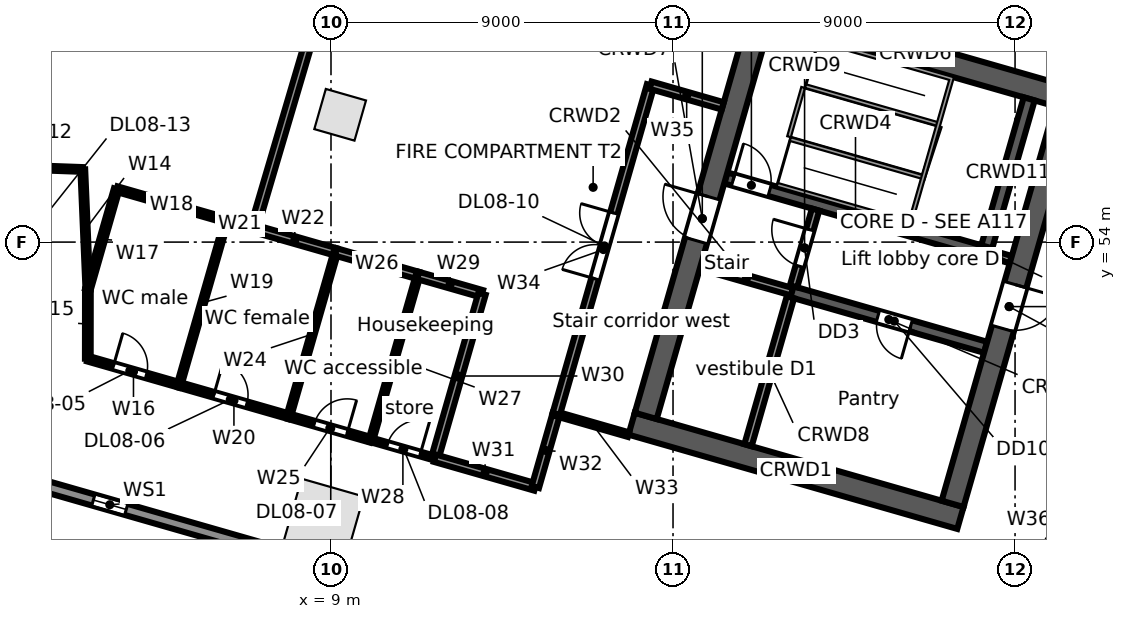
"""IFC4 building model, lengths in metres.
Left out: names, types, materials, properties, quantities, classifications, styles, units other than length and angle.
Written with IfcOpenShell. Run it as: python <this file> out.ifc"""

import sys

from ifc_helpers import new_model, si_unit, direction, frame, frame_2d, origin, origin_2d, place, context, subcontext, project, spatial, rectangle, extrude, element, fill, save


model = new_model("IFC4")
c1 = context("Model", 3, precision=1e-05, world=origin(), true_north=direction((0.0, 1.0)))
c2 = subcontext(c1, "Body", "Model", "MODEL_VIEW")
j1 = project(units=[si_unit("LENGTHUNIT", "METRE"), si_unit("PLANEANGLEUNIT", "RADIAN")], contexts=[c1])
p1 = place(None, origin())
s1 = spatial("IfcSite", under=j1, at=p1, CompositionType="ELEMENT")
p2 = place(p1, origin())
s2 = spatial("IfcBuilding", under=s1, at=p2, CompositionType="ELEMENT")
p3 = place(p2, frame((0.0, 0.0, 51.5)))
s3 = spatial("IfcBuildingStorey", under=s2, at=p3, CompositionType="ELEMENT", Elevation=51.5)
p4 = place(p3, frame((8.81, 46.722, 0.0), z_axis=(0.0, 0.0, 1.0), x_axis=(0.961261695938, -0.275637355817, 0.0)))
e1 = element("IfcColumn", 1, at=p4, inside=s3, PredefinedType="COLUMN", context=c2, shape_type="SweptSolid", body=[
    extrude(rectangle(XDim=1.7, YDim=1.7, at=origin_2d()), origin(), (0.0, 0.0, 1.0), 5.0),
])
p5 = place(p3, frame((9.241, 57.35, 0.0), z_axis=(0.0, 0.0, 1.0), x_axis=(0.961261695938, -0.275637355817, 0.0)))
e2 = element("IfcColumn", 2, at=p5, inside=s3, PredefinedType="COLUMN", context=c2, shape_type="SweptSolid", body=[
    extrude(rectangle(XDim=1.1, YDim=1.1, at=origin_2d()), origin(), (0.0, 0.0, 1.0), 5.0),
])
p6 = place(p3, frame((25.398, 40.717, 0.0), z_axis=(0.0, 0.0, 1.0), x_axis=(-0.961262423262, 0.275634819324, 0.0)))
e3 = element("IfcWall", 3, at=p6, inside=s3, PredefinedType="STANDARD", context=c2, shape_type="SweptSolid", body=[
    extrude(rectangle(XDim=26.359, YDim=0.3, at=frame_2d((13.179, 0.0))), origin(), (0.0, 0.0, 1.0), 4.68),
])
p7 = place(p6, frame((22.664, 0.0, 0.6)))
e4 = element("IfcOpeningElement", 4, at=p7, cuts=e3, PredefinedType="OPENING", context=c2, shape_type="SweptSolid", body=[
    extrude(rectangle(XDim=0.9, YDim=3.2, at=frame_2d((0.45, 1.6))), frame((0.0, 0.16, 0.0), z_axis=(0.0, -1.0, 0.0), x_axis=(1.0, 0.0, 0.0)), (0.0, 0.0, 1.0), 0.32),
])
p8 = place(p6, frame((13.844, 0.0, 0.6)))
e5 = element("IfcOpeningElement", 5, at=p8, cuts=e3, PredefinedType="OPENING", context=c2, shape_type="SweptSolid", body=[
    extrude(rectangle(XDim=0.9, YDim=3.2, at=frame_2d((0.45, 1.6))), frame((0.0, 0.16, 0.0), z_axis=(0.0, -1.0, 0.0), x_axis=(1.0, 0.0, 0.0)), (0.0, 0.0, 1.0), 0.32),
])
p9 = place(p6, frame((5.023, 0.0, 0.6)))
e6 = element("IfcOpeningElement", 6, at=p9, cuts=e3, PredefinedType="OPENING", context=c2, shape_type="SweptSolid", body=[
    extrude(rectangle(XDim=0.9, YDim=3.2, at=frame_2d((0.45, 1.6))), frame((0.0, 0.16, 0.0), z_axis=(0.0, -1.0, 0.0), x_axis=(1.0, 0.0, 0.0)), (0.0, 0.0, 1.0), 0.32),
])
p10 = place(p3, frame((16.911, 49.221, 0.0), z_axis=(0.0, 0.0, 1.0), x_axis=(0.96126248289, -0.275634611374, 0.0)))
e7 = element("IfcWall", 7, at=p10, inside=s3, PredefinedType="SOLIDWALL", context=c2, shape_type="SweptSolid", body=[
    extrude(rectangle(XDim=9.0, YDim=0.6, at=frame_2d((4.5, 0.0))), origin(), (0.0, 0.0, 1.0), 4.68),
])
p11 = place(p3, frame((18.728, 53.382, 0.0), z_axis=(0.0, 0.0, 1.0), x_axis=(0.961247070632, -0.275688355216, 0.0)))
e8 = element("IfcWall", 8, at=p11, inside=s3, PredefinedType="SOLIDWALL", context=c2, shape_type="SweptSolid", body=[
    extrude(rectangle(XDim=2.5, YDim=0.2, at=frame_2d((1.25, 0.0))), origin(), (0.0, 0.0, 1.0), 4.68),
])
p12 = place(p3, frame((21.131, 52.692, 0.0), z_axis=(0.0, 0.0, 1.0), x_axis=(0.961271492568, -0.275603188616, 0.0)))
e9 = element("IfcWall", 9, at=p12, inside=s3, PredefinedType="SOLIDWALL", context=c2, shape_type="SweptSolid", body=[
    extrude(rectangle(XDim=5.3, YDim=0.3, at=frame_2d((2.65, 0.0))), origin(), (0.0, 0.0, 1.0), 4.68),
])
p13 = place(p12, frame((2.35, 0.0, 0.0)))
e10 = element("IfcOpeningElement", 10, at=p13, cuts=e9, PredefinedType="OPENING", context=c2, shape_type="SweptSolid", body=[
    extrude(rectangle(XDim=0.9, YDim=2.1, at=frame_2d((0.45, 1.05))), frame((0.0, 0.16, 0.0), z_axis=(0.0, -1.0, 0.0), x_axis=(1.0, 0.0, 0.0)), (0.0, 0.0, 1.0), 0.32),
])
p14 = place(p3, frame((19.389, 55.689, 0.0), z_axis=(0.0, 0.0, 1.0), x_axis=(0.961261397636, -0.275638396117, 0.0)))
e11 = element("IfcWall", 11, at=p14, inside=s3, PredefinedType="SOLIDWALL", context=c2, shape_type="SweptSolid", body=[
    extrude(rectangle(XDim=7.1, YDim=0.3, at=frame_2d((3.55, 0.0))), origin(), (0.0, 0.0, 1.0), 4.68),
])
p15 = place(p14, frame((0.2, 0.0, 0.0)))
e12 = element("IfcOpeningElement", 12, at=p15, cuts=e11, PredefinedType="OPENING", context=c2, shape_type="SweptSolid", body=[
    extrude(rectangle(XDim=1.0, YDim=2.1, at=frame_2d((0.5, 1.05))), frame((0.0, 0.16, 0.0), z_axis=(0.0, -1.0, 0.0), x_axis=(1.0, 0.0, 0.0)), (0.0, 0.0, 1.0), 0.32),
])
p16 = place(p3, frame((26.214, 53.732, 0.0), z_axis=(0.0, 0.0, 1.0), x_axis=(0.96122076476, -0.27578005982, 0.0)))
e13 = element("IfcWall", 13, at=p16, inside=s3, PredefinedType="SOLIDWALL", context=c2, shape_type="SweptSolid", body=[
    extrude(rectangle(XDim=0.7, YDim=0.2, at=frame_2d((0.35, 0.0))), origin(), (0.0, 0.0, 1.0), 4.68),
])
p17 = place(p3, frame((20.053, 60.18, 0.0), z_axis=(0.0, 0.0, 1.0), x_axis=(0.96126248289, -0.275634611374, 0.0)))
e14 = element("IfcWall", 14, at=p17, inside=s3, PredefinedType="SOLIDWALL", context=c2, shape_type="SweptSolid", body=[
    extrude(rectangle(XDim=9.0, YDim=0.6, at=frame_2d((4.5, 0.0))), origin(), (0.0, 0.0, 1.0), 4.68),
])
p18 = place(p3, frame((17.282, 49.427, 0.0), z_axis=(0.0, 0.0, 1.0), x_axis=(0.275631631629, 0.961263337304, 0.0)))
e15 = element("IfcWall", 15, at=p18, inside=s3, PredefinedType="SOLIDWALL", context=c2, shape_type="SweptSolid", body=[
    extrude(rectangle(XDim=10.8, YDim=0.6, at=frame_2d((5.4, 0.0))), origin(), (0.0, 0.0, 1.0), 4.68),
])
p19 = place(p18, frame((4.8, 0.0, 0.0)))
e16 = element("IfcOpeningElement", 16, at=p19, cuts=e15, PredefinedType="OPENING", context=c2, shape_type="SweptSolid", body=[
    extrude(rectangle(XDim=1.2, YDim=2.1, at=frame_2d((0.6, 1.05))), frame((0.0, 0.31, 0.0), z_axis=(0.0, -1.0, 0.0), x_axis=(1.0, 0.0, 0.0)), (0.0, 0.0, 1.0), 0.62),
])
p20 = place(p3, frame((19.973, 48.655, 0.0), z_axis=(0.0, 0.0, 1.0), x_axis=(0.275668441653, 0.961252781674, 0.0)))
e17 = element("IfcWall", 17, at=p20, inside=s3, PredefinedType="SOLIDWALL", context=c2, shape_type="SweptSolid", body=[
    extrude(rectangle(XDim=4.05, YDim=0.2, at=frame_2d((2.025, 0.0))), origin(), (0.0, 0.0, 1.0), 4.68),
])
p21 = place(p3, frame((21.172, 52.837, 0.0), z_axis=(0.0, 0.0, 1.0), x_axis=(0.275657676022, 0.961255868981, 0.0)))
e18 = element("IfcWall", 18, at=p21, inside=s3, PredefinedType="PARTITIONING", context=c2, shape_type="SweptSolid", body=[
    extrude(rectangle(XDim=2.1, YDim=0.2, at=frame_2d((1.05, 0.0))), origin(), (0.0, 0.0, 1.0), 4.68),
])
p22 = place(p21, frame((0.55, 0.0, 0.0)))
e19 = element("IfcOpeningElement", 19, at=p22, cuts=e18, PredefinedType="OPENING", context=c2, shape_type="SweptSolid", body=[
    extrude(rectangle(XDim=1.0, YDim=2.1, at=frame_2d((0.5, 1.05))), frame((0.0, 0.11, 0.0), z_axis=(0.0, -1.0, 0.0), x_axis=(1.0, 0.0, 0.0)), (0.0, 0.0, 1.0), 0.22),
])
p23 = place(p3, frame((26.256, 53.876, 0.0), z_axis=(0.0, 0.0, 1.0), x_axis=(0.275612739511, 0.961268754209, 0.0)))
e20 = element("IfcWall", 20, at=p23, inside=s3, PredefinedType="SOLIDWALL", context=c2, shape_type="SweptSolid", body=[
    extrude(rectangle(XDim=4.05, YDim=0.3, at=frame_2d((2.025, 0.0))), origin(), (0.0, 0.0, 1.0), 4.68),
])
p24 = place(p3, frame((25.356, 47.112, 0.0), z_axis=(0.0, 0.0, 1.0), x_axis=(0.275631631629, 0.961263337304, 0.0)))
e21 = element("IfcWall", 21, at=p24, inside=s3, PredefinedType="SOLIDWALL", context=c2, shape_type="SweptSolid", body=[
    extrude(rectangle(XDim=10.8, YDim=0.6, at=frame_2d((5.4, 0.0))), origin(), (0.0, 0.0, 1.0), 4.68),
])
p25 = place(p24, frame((4.8, 0.0, 0.0)))
e22 = element("IfcOpeningElement", 22, at=p25, cuts=e21, PredefinedType="OPENING", context=c2, shape_type="SweptSolid", body=[
    extrude(rectangle(XDim=1.2, YDim=2.1, at=frame_2d((0.6, 1.05))), frame((0.0, 0.31, 0.0), z_axis=(0.0, -1.0, 0.0), x_axis=(1.0, 0.0, 0.0)), (0.0, 0.0, 1.0), 0.62),
])
p26 = place(p3, frame((0.0, 56.0, 0.0), z_axis=(0.0, 0.0, 1.0), x_axis=(0.999349313684, -0.036068673934, 0.0)))
e23 = element("IfcWall", 23, at=p26, inside=s3, PredefinedType="PARTITIONING", context=c2, shape_type="SweptSolid", body=[
    extrude(rectangle(XDim=2.471, YDim=0.125, at=frame_2d((1.235, 0.0))), origin(), (0.0, 0.0, 1.0), 4.68),
])
p27 = place(p26, frame((0.7, 0.0, 0.0)))
e24 = element("IfcOpeningElement", 24, at=p27, cuts=e23, PredefinedType="OPENING", context=c2, shape_type="SweptSolid", body=[
    extrude(rectangle(XDim=0.9, YDim=2.1, at=frame_2d((0.45, 1.05))), frame((0.0, 0.073, 0.0), z_axis=(0.0, -1.0, 0.0), x_axis=(1.0, 0.0, 0.0)), (0.0, 0.0, 1.0), 0.145),
])
p28 = place(p3, frame((2.469, 55.911, 0.0), z_axis=(0.0, 0.0, 1.0), x_axis=(0.042391721597, -0.99910106693, 0.0)))
e25 = element("IfcWall", 25, at=p28, inside=s3, PredefinedType="PARTITIONING", context=c2, shape_type="SweptSolid", body=[
    extrude(rectangle(XDim=3.162, YDim=0.125, at=frame_2d((1.581, 0.0))), origin(), (0.0, 0.0, 1.0), 4.68),
])
p29 = place(p3, frame((2.601, 50.932, 0.0), z_axis=(0.0, 0.0, 1.0), x_axis=(0.001073104681, 0.999999424223, 0.0)))
e26 = element("IfcWall", 26, at=p29, inside=s3, PredefinedType="PARTITIONING", context=c2, shape_type="SweptSolid", body=[
    extrude(rectangle(XDim=1.82, YDim=0.15, at=frame_2d((0.91, 0.0))), origin(), (0.0, 0.0, 1.0), 4.68),
])
p30 = place(p3, frame((2.601, 50.932, 0.0), z_axis=(0.0, 0.0, 1.0), x_axis=(0.961265528111, -0.275623991092, 0.0)))
e27 = element("IfcWall", 27, at=p30, inside=s3, PredefinedType="PARTITIONING", context=c2, shape_type="SweptSolid", body=[
    extrude(rectangle(XDim=2.5, YDim=0.15, at=frame_2d((1.25, 0.0))), origin(), (0.0, 0.0, 1.0), 4.68),
])
p31 = place(p30, frame((0.7, 0.0, 0.0)))
e28 = element("IfcOpeningElement", 28, at=p31, cuts=e27, PredefinedType="OPENING", context=c2, shape_type="SweptSolid", body=[
    extrude(rectangle(XDim=0.9, YDim=2.1, at=frame_2d((0.45, 1.05))), frame((0.0, 0.085, 0.0), z_axis=(0.0, -1.0, 0.0), x_axis=(1.0, 0.0, 0.0)), (0.0, 0.0, 1.0), 0.17),
])
p32 = place(p3, frame((2.603, 52.752, 0.0), z_axis=(0.0, 0.0, 1.0), x_axis=(0.27569433145, 0.961245356611, 0.0)))
e29 = element("IfcWall", 29, at=p32, inside=s3, PredefinedType="PARTITIONING", context=c2, shape_type="SweptSolid", body=[
    extrude(rectangle(XDim=2.75, YDim=0.15, at=frame_2d((1.375, 0.0))), origin(), (0.0, 0.0, 1.0), 4.68),
])
p33 = place(p3, frame((3.361, 55.395, 0.0), z_axis=(0.0, 0.0, 1.0), x_axis=(0.961268664977, -0.27561305073, 0.0)))
e30 = element("IfcWall", 30, at=p33, inside=s3, PredefinedType="PARTITIONING", context=c2, shape_type="SweptSolid", body=[
    extrude(rectangle(XDim=3.0, YDim=0.15, at=frame_2d((1.5, 0.0))), origin(), (0.0, 0.0, 1.0), 4.68),
])
p34 = place(p3, frame((5.004, 50.243, 0.0), z_axis=(0.0, 0.0, 1.0), x_axis=(0.275838825927, 0.961203902464, 0.0)))
e31 = element("IfcWall", 31, at=p34, inside=s3, PredefinedType="PARTITIONING", context=c2, shape_type="SweptSolid", body=[
    extrude(rectangle(XDim=4.5, YDim=0.125, at=frame_2d((2.25, 0.0))), origin(), (0.0, 0.0, 1.0), 4.68),
])
p35 = place(p3, frame((5.004, 50.243, 0.0), z_axis=(0.0, 0.0, 1.0), x_axis=(0.961268664977, -0.27561305073, 0.0)))
e32 = element("IfcWall", 32, at=p35, inside=s3, PredefinedType="PARTITIONING", context=c2, shape_type="SweptSolid", body=[
    extrude(rectangle(XDim=3.0, YDim=0.15, at=frame_2d((1.5, 0.0))), origin(), (0.0, 0.0, 1.0), 4.68),
])
p36 = place(p35, frame((0.95, 0.0, 0.0)))
e33 = element("IfcOpeningElement", 33, at=p36, cuts=e32, PredefinedType="OPENING", context=c2, shape_type="SweptSolid", body=[
    extrude(rectangle(XDim=0.9, YDim=2.1, at=frame_2d((0.45, 1.05))), frame((0.0, 0.085, 0.0), z_axis=(0.0, -1.0, 0.0), x_axis=(1.0, 0.0, 0.0)), (0.0, 0.0, 1.0), 0.17),
])
p37 = place(p3, frame((6.245, 54.568, 0.0), z_axis=(0.0, 0.0, 1.0), x_axis=(0.961499370144, -0.274807134575, 0.0)))
e34 = element("IfcWall", 34, at=p37, inside=s3, PredefinedType="PARTITIONING", context=c2, shape_type="SweptSolid", body=[
    extrude(rectangle(XDim=0.75, YDim=0.15, at=frame_2d((0.375, 0.0))), origin(), (0.0, 0.0, 1.0), 4.68),
])
p38 = place(p3, frame((6.966, 54.362, 0.0), z_axis=(0.0, 0.0, 1.0), x_axis=(0.961154610169, -0.276010534854, 0.0)))
e35 = element("IfcWall", 35, at=p38, inside=s3, PredefinedType="PARTITIONING", context=c2, shape_type="SweptSolid", body=[
    extrude(rectangle(XDim=2.25, YDim=0.2, at=frame_2d((1.125, 0.0))), origin(), (0.0, 0.0, 1.0), 3.852),
])
p39 = place(p3, frame((6.966, 54.362, 0.0), z_axis=(0.0, 0.0, 1.0), x_axis=(0.283027392509, 0.959111826165, 0.0)))
e36 = element("IfcWall", 36, at=p39, inside=s3, PredefinedType="PARTITIONING", context=c2, shape_type="SweptSolid", body=[
    extrude(rectangle(XDim=12.985, YDim=0.2, at=frame_2d((6.492, 0.0))), origin(), (0.0, 0.0, 1.0), 3.742),
])
p40 = place(p3, frame((7.888, 49.416, 0.0), z_axis=(0.0, 0.0, 1.0), x_axis=(0.275803080638, 0.96121415965, 0.0)))
e37 = element("IfcWall", 37, at=p40, inside=s3, PredefinedType="PARTITIONING", context=c2, shape_type="SweptSolid", body=[
    extrude(rectangle(XDim=4.5, YDim=0.125, at=frame_2d((2.25, 0.0))), origin(), (0.0, 0.0, 1.0), 3.852),
])
p41 = place(p3, frame((7.888, 49.416, 0.0), z_axis=(0.0, 0.0, 1.0), x_axis=(0.9611628742, -0.275981755301, 0.0)))
e38 = element("IfcWall", 38, at=p41, inside=s3, PredefinedType="PARTITIONING", context=c2, shape_type="SweptSolid", body=[
    extrude(rectangle(XDim=2.25, YDim=0.15, at=frame_2d((1.125, 0.0))), origin(), (0.0, 0.0, 1.0), 3.742),
])
p42 = place(p41, frame((0.7, 0.0, 0.0)))
e39 = element("IfcOpeningElement", 39, at=p42, cuts=e38, PredefinedType="OPENING", context=c2, shape_type="SweptSolid", body=[
    extrude(rectangle(XDim=0.9, YDim=2.1, at=frame_2d((0.45, 1.05))), frame((0.0, 0.085, 0.0), z_axis=(0.0, -1.0, 0.0), x_axis=(1.0, 0.0, 0.0)), (0.0, 0.0, 1.0), 0.17),
])
p43 = place(p3, frame((9.129, 53.741, 0.0), z_axis=(0.0, 0.0, 1.0), x_axis=(0.961273691875, -0.275595517578, 0.0)))
e40 = element("IfcWall", 40, at=p43, inside=s3, PredefinedType="PARTITIONING", context=c2, shape_type="SweptSolid", body=[
    extrude(rectangle(XDim=2.249, YDim=0.2, at=frame_2d((1.125, 0.0))), origin(), (0.0, 0.0, 1.0), 3.742),
])
p44 = place(p3, frame((10.051, 48.795, 0.0), z_axis=(0.0, 0.0, 1.0), x_axis=(0.275530671241, 0.961292280841, 0.0)))
e41 = element("IfcWall", 41, at=p44, inside=s3, PredefinedType="PARTITIONING", context=c2, shape_type="SweptSolid", body=[
    extrude(rectangle(XDim=4.5, YDim=0.125, at=frame_2d((2.25, 0.0))), origin(), (0.0, 0.0, 1.0), 4.68),
])
p45 = place(p3, frame((10.051, 48.795, 0.0), z_axis=(0.0, 0.0, 1.0), x_axis=(0.961313033798, -0.275458256455, 0.0)))
e42 = element("IfcWall", 42, at=p45, inside=s3, PredefinedType="PARTITIONING", context=c2, shape_type="SweptSolid", body=[
    extrude(rectangle(XDim=1.75, YDim=0.125, at=frame_2d((0.875, 0.0))), origin(), (0.0, 0.0, 1.0), 4.68),
])
p46 = place(p45, frame((0.45, 0.0, 0.0)))
e43 = element("IfcOpeningElement", 43, at=p46, cuts=e42, PredefinedType="OPENING", context=c2, shape_type="SweptSolid", body=[
    extrude(rectangle(XDim=0.9, YDim=2.1, at=frame_2d((0.45, 1.05))), frame((0.0, 0.073, 0.0), z_axis=(0.0, -1.0, 0.0), x_axis=(1.0, 0.0, 0.0)), (0.0, 0.0, 1.0), 0.145),
])
p47 = place(p3, frame((11.291, 53.121, 0.0), z_axis=(0.0, 0.0, 1.0), x_axis=(0.961329010357, -0.275402494264, 0.0)))
e44 = element("IfcWall", 44, at=p47, inside=s3, PredefinedType="PARTITIONING", context=c2, shape_type="SweptSolid", body=[
    extrude(rectangle(XDim=1.751, YDim=0.2, at=frame_2d((0.875, 0.0))), origin(), (0.0, 0.0, 1.0), 4.68),
])
p48 = place(p3, frame((11.733, 48.313, 0.0), z_axis=(0.0, 0.0, 1.0), x_axis=(0.275795676316, 0.961216284155, 0.0)))
e45 = element("IfcWall", 45, at=p48, inside=s3, PredefinedType="PARTITIONING", context=c2, shape_type="SweptSolid", body=[
    extrude(rectangle(XDim=4.5, YDim=0.2, at=frame_2d((2.25, 0.0))), origin(), (0.0, 0.0, 1.0), 4.68),
])
p49 = place(p3, frame((11.733, 48.313, 0.0), z_axis=(0.0, 0.0, 1.0), x_axis=(0.961272337704, -0.275600240865, 0.0)))
e46 = element("IfcWall", 46, at=p49, inside=s3, PredefinedType="PARTITIONING", context=c2, shape_type="SweptSolid", body=[
    extrude(rectangle(XDim=2.75, YDim=0.2, at=frame_2d((1.375, 0.0))), origin(), (0.0, 0.0, 1.0), 4.68),
])
p50 = place(p3, frame((14.377, 47.555, 0.0), z_axis=(0.0, 0.0, 1.0), x_axis=(0.275446387355, 0.961316434736, 0.0)))
e47 = element("IfcWall", 47, at=p50, inside=s3, PredefinedType="PARTITIONING", context=c2, shape_type="SweptSolid", body=[
    extrude(rectangle(XDim=2.0, YDim=0.2, at=frame_2d((1.0, 0.0))), origin(), (0.0, 0.0, 1.0), 4.68),
])
p51 = place(p3, frame((14.928, 49.478, 0.0), z_axis=(0.0, 0.0, 1.0), x_axis=(0.961243778232, -0.27569983462, 0.0)))
e48 = element("IfcWall", 48, at=p51, inside=s3, PredefinedType="PARTITIONING", context=c2, shape_type="SweptSolid", body=[
    extrude(rectangle(XDim=1.977, YDim=0.125, at=frame_2d((0.988, 0.0))), origin(), (0.0, 0.0, 1.0), 4.68),
])
p52 = place(p3, frame((14.928, 49.478, 0.0), z_axis=(0.0, 0.0, 1.0), x_axis=(0.275674053528, 0.961251172281, 0.0)))
e49 = element("IfcWall", 49, at=p52, inside=s3, PredefinedType="PARTITIONING", context=c2, shape_type="SweptSolid", body=[
    extrude(rectangle(XDim=9.0, YDim=0.2, at=frame_2d((4.5, 0.0))), origin(), (0.0, 0.0, 1.0), 3.742),
])
p53 = place(p52, frame((3.7, 0.0, 0.0)))
e50 = element("IfcOpeningElement", 50, at=p53, cuts=e49, PredefinedType="OPENING", context=c2, shape_type="SweptSolid", body=[
    extrude(rectangle(XDim=1.8, YDim=2.1, at=frame_2d((0.9, 1.05))), frame((0.0, 0.11, 0.0), z_axis=(0.0, -1.0, 0.0), x_axis=(1.0, 0.0, 0.0)), (0.0, 0.0, 1.0), 0.22),
])
p54 = place(p3, frame((17.409, 58.129, 0.0), z_axis=(0.0, 0.0, 1.0), x_axis=(0.961253165474, -0.275667103345, 0.0)))
e51 = element("IfcWall", 51, at=p54, inside=s3, PredefinedType="PARTITIONING", context=c2, shape_type="SweptSolid", body=[
    extrude(rectangle(XDim=1.977, YDim=0.2, at=frame_2d((0.988, 0.0))), origin(), (0.0, 0.0, 1.0), 4.68),
])
p55 = place(p3, frame((26.456, 42.338, 0.0), z_axis=(0.0, 0.0, 1.0), x_axis=(0.52980027265, 0.848122438743, 0.0)))
e52 = element("IfcWall", 52, at=p55, inside=s3, PredefinedType="PARTITIONING", context=c2, shape_type="SweptSolid", body=[
    extrude(rectangle(XDim=6.076, YDim=0.25, at=frame_2d((3.038, 0.0))), origin(), (0.0, 0.0, 1.0), 4.68),
])
p56 = place(p55, frame((2.2, 0.0, 0.0)))
e53 = element("IfcOpeningElement", 53, at=p56, cuts=e52, PredefinedType="OPENING", context=c2, shape_type="SweptSolid", body=[
    extrude(rectangle(XDim=1.8, YDim=2.1, at=frame_2d((0.9, 1.05))), frame((0.0, 0.135, 0.0), z_axis=(0.0, -1.0, 0.0), x_axis=(1.0, 0.0, 0.0)), (0.0, 0.0, 1.0), 0.27),
])
p57 = place(p7, origin())
e54 = element("IfcWindow", 54, at=p57, inside=s3, PartitioningType="SINGLE_PANEL", PredefinedType="WINDOW", context=c2, shape_type="SweptSolid", body=[
    extrude(rectangle(XDim=0.9, YDim=3.2, at=frame_2d((0.45, 1.6))), frame((0.0, 0.03, 0.0), z_axis=(0.0, -1.0, 0.0), x_axis=(1.0, 0.0, 0.0)), (0.0, 0.0, 1.0), 0.06),
])
fill(e4, e54)
p58 = place(p15, origin())
e55 = element("IfcDoor", 55, at=p58, inside=s3, OperationType="SINGLE_SWING_LEFT", PredefinedType="DOOR", context=c2, shape_type="SweptSolid", body=[
    extrude(rectangle(XDim=1.0, YDim=2.1, at=frame_2d((0.5, 1.05))), frame((0.0, 0.025, 0.0), z_axis=(0.0, -1.0, 0.0), x_axis=(1.0, 0.0, 0.0)), (0.0, 0.0, 1.0), 0.05),
])
fill(e12, e55)
p59 = place(p22, origin())
e56 = element("IfcDoor", 56, at=p59, inside=s3, OperationType="SINGLE_SWING_RIGHT", PredefinedType="DOOR", context=c2, shape_type="SweptSolid", body=[
    extrude(rectangle(XDim=1.0, YDim=2.1, at=frame_2d((0.5, 1.05))), frame((0.0, 0.025, 0.0), z_axis=(0.0, -1.0, 0.0), x_axis=(1.0, 0.0, 0.0)), (0.0, 0.0, 1.0), 0.05),
])
fill(e19, e56)
p60 = place(p19, origin())
e57 = element("IfcDoor", 57, at=p60, inside=s3, OperationType="SINGLE_SWING_RIGHT", PredefinedType="DOOR", context=c2, shape_type="SweptSolid", body=[
    extrude(rectangle(XDim=1.2, YDim=2.1, at=frame_2d((0.6, 1.05))), frame((0.0, 0.025, 0.0), z_axis=(0.0, -1.0, 0.0), x_axis=(1.0, 0.0, 0.0)), (0.0, 0.0, 1.0), 0.05),
])
fill(e16, e57)
p61 = place(p25, frame((1.2, 0.0, 0.0), z_axis=(0.0, 0.0, 1.0), x_axis=(-1.0, 0.0, 0.0)))
e58 = element("IfcDoor", 58, at=p61, inside=s3, OperationType="SINGLE_SWING_LEFT", PredefinedType="DOOR", context=c2, shape_type="SweptSolid", body=[
    extrude(rectangle(XDim=1.2, YDim=2.1, at=frame_2d((0.6, 1.05))), frame((0.0, 0.025, 0.0), z_axis=(0.0, -1.0, 0.0), x_axis=(1.0, 0.0, 0.0)), (0.0, 0.0, 1.0), 0.05),
])
fill(e22, e58)
p62 = place(p13, frame((0.9, 0.0, 0.0), z_axis=(0.0, 0.0, 1.0), x_axis=(-1.0, 0.0, 0.0)))
e59 = element("IfcDoor", 59, at=p62, inside=s3, OperationType="SINGLE_SWING_LEFT", PredefinedType="DOOR", context=c2, shape_type="SweptSolid", body=[
    extrude(rectangle(XDim=0.9, YDim=2.1, at=frame_2d((0.45, 1.05))), frame((0.0, 0.025, 0.0), z_axis=(0.0, -1.0, 0.0), x_axis=(1.0, 0.0, 0.0)), (0.0, 0.0, 1.0), 0.05),
])
fill(e10, e59)
p63 = place(p31, origin())
e60 = element("IfcDoor", 60, at=p63, inside=s3, OperationType="SINGLE_SWING_LEFT", PredefinedType="DOOR", context=c2, shape_type="SweptSolid", body=[
    extrude(rectangle(XDim=0.9, YDim=2.1, at=frame_2d((0.45, 1.05))), frame((0.0, 0.025, 0.0), z_axis=(0.0, -1.0, 0.0), x_axis=(1.0, 0.0, 0.0)), (0.0, 0.0, 1.0), 0.05),
])
fill(e28, e60)
p64 = place(p36, origin())
e61 = element("IfcDoor", 61, at=p64, inside=s3, OperationType="SINGLE_SWING_LEFT", PredefinedType="DOOR", context=c2, shape_type="SweptSolid", body=[
    extrude(rectangle(XDim=0.9, YDim=2.1, at=frame_2d((0.45, 1.05))), frame((0.0, 0.025, 0.0), z_axis=(0.0, -1.0, 0.0), x_axis=(1.0, 0.0, 0.0)), (0.0, 0.0, 1.0), 0.05),
])
fill(e33, e61)
p65 = place(p42, origin())
e62 = element("IfcDoor", 62, at=p65, inside=s3, OperationType="SINGLE_SWING_RIGHT", PredefinedType="DOOR", context=c2, shape_type="SweptSolid", body=[
    extrude(rectangle(XDim=0.9, YDim=2.1, at=frame_2d((0.45, 1.05))), frame((0.0, 0.025, 0.0), z_axis=(0.0, -1.0, 0.0), x_axis=(1.0, 0.0, 0.0)), (0.0, 0.0, 1.0), 0.05),
])
fill(e39, e62)
p66 = place(p46, origin())
e63 = element("IfcDoor", 63, at=p66, inside=s3, OperationType="SINGLE_SWING_RIGHT", PredefinedType="DOOR", context=c2, shape_type="SweptSolid", body=[
    extrude(rectangle(XDim=0.9, YDim=2.1, at=frame_2d((0.45, 1.05))), frame((0.0, 0.025, 0.0), z_axis=(0.0, -1.0, 0.0), x_axis=(1.0, 0.0, 0.0)), (0.0, 0.0, 1.0), 0.05),
])
fill(e43, e63)
p67 = place(p53, origin())
e64 = element("IfcDoor", 64, at=p67, inside=s3, OperationType="DOUBLE_DOOR_SINGLE_SWING", PredefinedType="DOOR", context=c2, shape_type="SweptSolid", body=[
    extrude(rectangle(XDim=1.8, YDim=2.1, at=frame_2d((0.9, 1.05))), frame((0.0, 0.025, 0.0), z_axis=(0.0, -1.0, 0.0), x_axis=(1.0, 0.0, 0.0)), (0.0, 0.0, 1.0), 0.05),
])
fill(e50, e64)
save(model, sys.argv[1])
